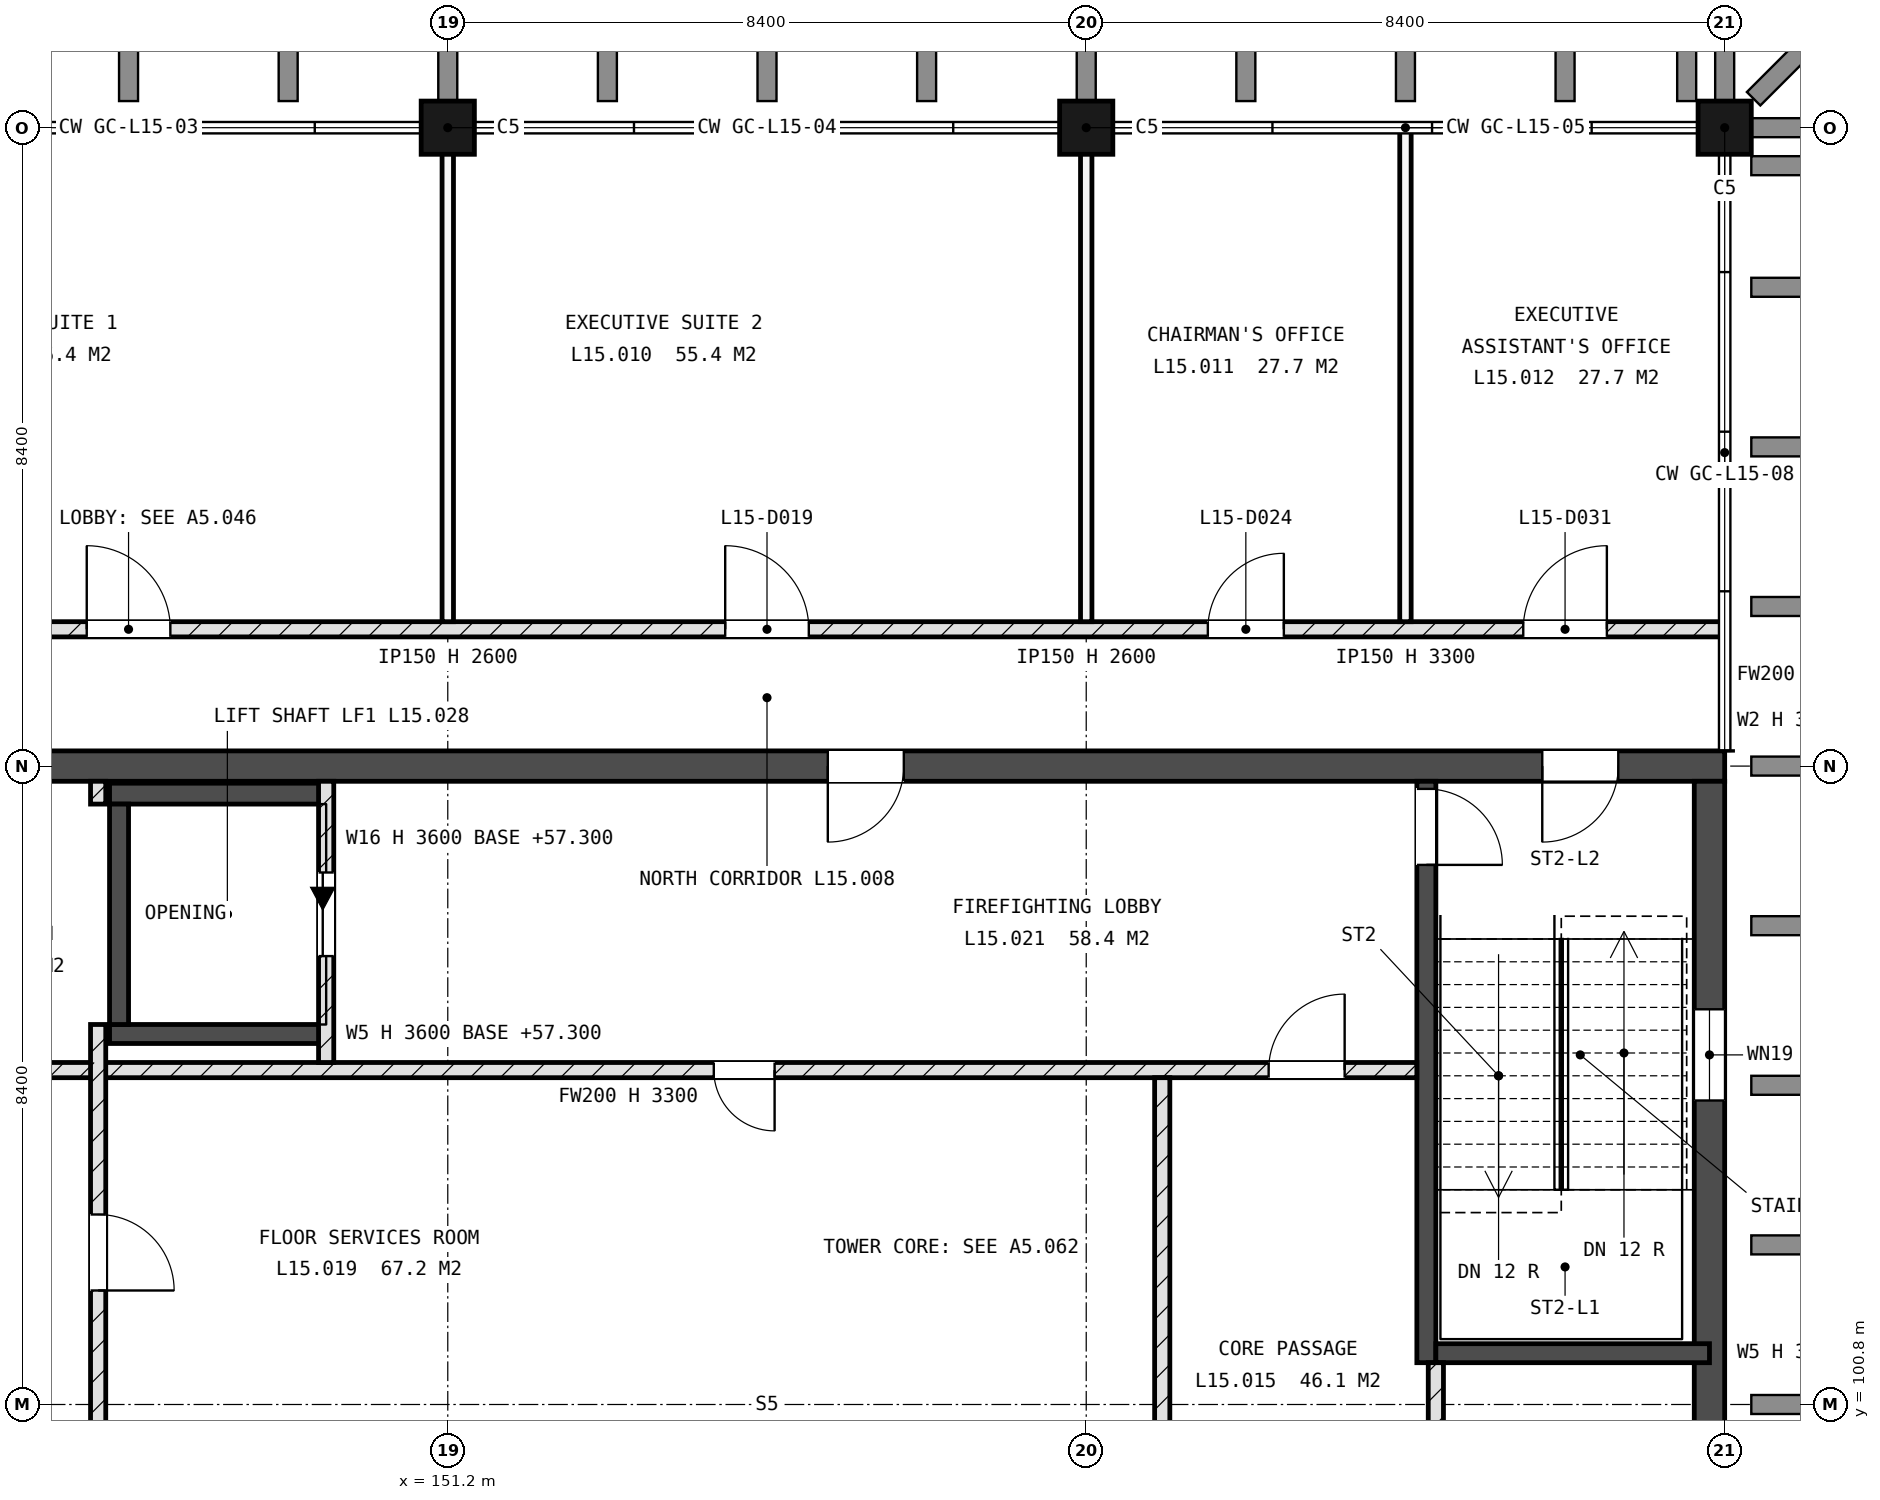
"""IFC4 building model, lengths in metres.
Left out: names, types, materials, properties, quantities, classifications, styles, units other than length and angle.
Written with IfcOpenShell. Run it as: python <this file> out.ifc"""

import sys

from ifc_helpers import new_model, si_unit, direction, frame, frame_2d, origin, origin_2d, place, context, subcontext, project, spatial, rectangle, extrude, element, fill, save


model = new_model("IFC4")
c1 = context("Model", 3, precision=1e-05, world=origin(), true_north=direction((0.0, 1.0)))
c2 = subcontext(c1, "Body", "Model", "MODEL_VIEW")
j1 = project(units=[si_unit("LENGTHUNIT", "METRE"), si_unit("PLANEANGLEUNIT", "RADIAN")], contexts=[c1])
p1 = place(None, origin())
s1 = spatial("IfcSite", under=j1, at=p1, CompositionType="ELEMENT")
p2 = place(p1, origin())
s2 = spatial("IfcBuilding", under=s1, at=p2, CompositionType="ELEMENT")
p3 = place(p2, frame((0.0, 0.0, 57.6)))
s3 = spatial("IfcBuildingStorey", under=s2, at=p3, CompositionType="ELEMENT", Elevation=57.6)
for number, where, z_axis, x_axis in (
    (1, (151.2, 117.6, -0.3), (0.0, 0.0, 1.0), (1.0, 0.0, 0.0)),
    (2, (159.6, 117.6, -0.3), (0.0, 0.0, 1.0), (1.0, 0.0, 0.0)),
    (3, (168.0, 117.6, -0.3), (0.0, 0.0, 1.0), (1.0, 0.0, 0.0)),
):
    element("IfcColumn", number, at=place(p3, frame(where, z_axis=z_axis, x_axis=x_axis)), inside=s3, PredefinedType="COLUMN", context=c2, shape_type="SweptSolid", body=[
        extrude(rectangle(XDim=0.7, YDim=0.7, at=origin_2d()), origin(), (0.0, 0.0, 1.0), 3.6),
    ])
p4 = place(p3, frame((142.8, 109.2, -0.3), z_axis=(0.0, 0.0, 1.0), x_axis=(1.0, 0.0, 0.0)))
e4 = element("IfcWall", 4, at=p4, inside=s3, PredefinedType="SHEAR", context=c2, shape_type="SweptSolid", body=[
    extrude(rectangle(XDim=25.2, YDim=0.4, at=frame_2d((12.6, 0.0))), origin(), (0.0, 0.0, 1.0), 3.6),
])
p5 = place(p4, frame((22.8, 0.0, 0.3)))
e5 = element("IfcOpeningElement", 5, at=p5, cuts=e4, PredefinedType="OPENING", context=c2, shape_type="SweptSolid", body=[
    extrude(rectangle(XDim=1.0, YDim=2.1, at=frame_2d((0.5, 1.05))), frame((0.0, 0.21, 0.0), z_axis=(0.0, -1.0, 0.0), x_axis=(1.0, 0.0, 0.0)), (0.0, 0.0, 1.0), 0.42),
])
p6 = place(p4, frame((1.5, 0.0, 0.3)))
e6 = element("IfcOpeningElement", 6, at=p6, cuts=e4, PredefinedType="OPENING", context=c2, shape_type="SweptSolid", body=[
    extrude(rectangle(XDim=0.8, YDim=2.1, at=frame_2d((0.4, 1.05))), frame((0.0, 0.21, 0.0), z_axis=(0.0, -1.0, 0.0), x_axis=(1.0, 0.0, 0.0)), (0.0, 0.0, 1.0), 0.42),
])
p7 = place(p4, frame((13.4, 0.0, 0.3)))
e7 = element("IfcOpeningElement", 7, at=p7, cuts=e4, PredefinedType="OPENING", context=c2, shape_type="SweptSolid", body=[
    extrude(rectangle(XDim=1.0, YDim=2.1, at=frame_2d((0.5, 1.05))), frame((0.0, 0.21, 0.0), z_axis=(0.0, -1.0, 0.0), x_axis=(1.0, 0.0, 0.0)), (0.0, 0.0, 1.0), 0.42),
])
p8 = place(p3, frame((167.8, 92.6, -0.3), z_axis=(0.0, 0.0, 1.0), x_axis=(0.0, 1.0, 0.0)))
e8 = element("IfcWall", 8, at=p8, inside=s3, PredefinedType="SHEAR", context=c2, shape_type="SweptSolid", body=[
    extrude(rectangle(XDim=16.4, YDim=0.4, at=frame_2d((8.2, 0.0))), origin(), (0.0, 0.0, 1.0), 3.6),
])
p9 = place(p8, frame((12.2, 0.0, 1.9)))
e9 = element("IfcOpeningElement", 9, at=p9, cuts=e8, PredefinedType="OPENING", context=c2, shape_type="SweptSolid", body=[
    extrude(rectangle(XDim=1.2, YDim=0.9, at=frame_2d((0.6, 0.45))), frame((0.0, 0.21, 0.0), z_axis=(0.0, -1.0, 0.0), x_axis=(1.0, 0.0, 0.0)), (0.0, 0.0, 1.0), 0.42),
])
p10 = place(p3, frame((164.075, 101.35, -0.3), z_axis=(0.0, 0.0, 1.0), x_axis=(0.0, 1.0, 0.0)))
e10 = element("IfcWall", 10, at=p10, inside=s3, PredefinedType="SHEAR", context=c2, shape_type="SweptSolid", body=[
    extrude(rectangle(XDim=7.65, YDim=0.25, at=frame_2d((3.825, 0.0))), origin(), (0.0, 0.0, 1.0), 3.6),
])
p11 = place(p10, frame((6.55, 0.0, 0.3)))
e11 = element("IfcOpeningElement", 11, at=p11, cuts=e10, PredefinedType="OPENING", context=c2, shape_type="SweptSolid", body=[
    extrude(rectangle(XDim=1.0, YDim=2.1, at=frame_2d((0.5, 1.05))), frame((0.0, 0.135, 0.0), z_axis=(0.0, -1.0, 0.0), x_axis=(1.0, 0.0, 0.0)), (0.0, 0.0, 1.0), 0.27),
])
p12 = place(p3, frame((164.2, 101.475, -0.3), z_axis=(0.0, 0.0, 1.0), x_axis=(1.0, 0.0, 0.0)))
e12 = element("IfcWall", 12, at=p12, inside=s3, PredefinedType="SHEAR", context=c2, shape_type="SweptSolid", body=[
    extrude(rectangle(XDim=3.6, YDim=0.25, at=frame_2d((1.8, 0.0))), origin(), (0.0, 0.0, 1.0), 3.6),
])
p13 = place(p3, frame((146.75, 105.675, -0.3), z_axis=(0.0, 0.0, 1.0), x_axis=(1.0, 0.0, 0.0)))
e13 = element("IfcWall", 13, at=p13, inside=s3, PredefinedType="SHEAR", context=c2, shape_type="SweptSolid", body=[
    extrude(rectangle(XDim=2.85, YDim=0.25, at=frame_2d((1.425, 0.0))), origin(), (0.0, 0.0, 1.0), 3.6),
])
p14 = place(p3, frame((146.75, 108.837, -0.3), z_axis=(0.0, 0.0, 1.0), x_axis=(1.0, 0.0, 0.0)))
e14 = element("IfcWall", 14, at=p14, inside=s3, PredefinedType="SHEAR", context=c2, shape_type="SweptSolid", body=[
    extrude(rectangle(XDim=2.85, YDim=0.275, at=frame_2d((1.425, 0.0))), origin(), (0.0, 0.0, 1.0), 3.6),
])
p15 = place(p3, frame((146.875, 105.8, -0.3), z_axis=(0.0, 0.0, 1.0), x_axis=(0.0, 1.0, 0.0)))
e15 = element("IfcWall", 15, at=p15, inside=s3, PredefinedType="SHEAR", context=c2, shape_type="SweptSolid", body=[
    extrude(rectangle(XDim=2.9, YDim=0.25, at=frame_2d((1.45, 0.0))), origin(), (0.0, 0.0, 1.0), 3.6),
])
p16 = place(p3, frame((143.2, 105.2, 0.0), z_axis=(0.0, 0.0, 1.0), x_axis=(1.0, 0.0, 0.0)))
e16 = element("IfcWall", 16, at=p16, inside=s3, PredefinedType="SOLIDWALL", context=c2, shape_type="SweptSolid", body=[
    extrude(rectangle(XDim=20.75, YDim=0.2, at=frame_2d((10.375, 0.0))), origin(), (0.0, 0.0, 1.0), 3.3),
])
p17 = place(p16, frame((11.5, 0.0, 0.0)))
e17 = element("IfcOpeningElement", 17, at=p17, cuts=e16, PredefinedType="OPENING", context=c2, shape_type="SweptSolid", body=[
    extrude(rectangle(XDim=0.8, YDim=2.1, at=frame_2d((0.4, 1.05))), frame((0.0, 0.11, 0.0), z_axis=(0.0, -1.0, 0.0), x_axis=(1.0, 0.0, 0.0)), (0.0, 0.0, 1.0), 0.22),
])
p18 = place(p16, frame((18.8, 0.0, 0.0)))
e18 = element("IfcOpeningElement", 18, at=p18, cuts=e16, PredefinedType="OPENING", context=c2, shape_type="SweptSolid", body=[
    extrude(rectangle(XDim=1.0, YDim=2.1, at=frame_2d((0.5, 1.05))), frame((0.0, 0.11, 0.0), z_axis=(0.0, -1.0, 0.0), x_axis=(1.0, 0.0, 0.0)), (0.0, 0.0, 1.0), 0.22),
])
p19 = place(p3, frame((142.8, 111.0, 0.0), z_axis=(0.0, 0.0, 1.0), x_axis=(1.0, 0.0, 0.0)))
e19 = element("IfcWall", 19, at=p19, inside=s3, PredefinedType="SOLIDWALL", context=c2, shape_type="SweptSolid", body=[
    extrude(rectangle(XDim=25.2, YDim=0.2, at=frame_2d((12.6, 0.0))), origin(), (0.0, 0.0, 1.0), 3.3),
])
p20 = place(p19, frame((3.65, 0.0, 0.0)))
e20 = element("IfcOpeningElement", 20, at=p20, cuts=e19, PredefinedType="OPENING", context=c2, shape_type="SweptSolid", body=[
    extrude(rectangle(XDim=1.1, YDim=2.25, at=frame_2d((0.55, 1.125))), frame((0.0, 0.11, 0.0), z_axis=(0.0, -1.0, 0.0), x_axis=(1.0, 0.0, 0.0)), (0.0, 0.0, 1.0), 0.22),
])
p21 = place(p19, frame((12.05, 0.0, 0.0)))
e21 = element("IfcOpeningElement", 21, at=p21, cuts=e19, PredefinedType="OPENING", context=c2, shape_type="SweptSolid", body=[
    extrude(rectangle(XDim=1.1, YDim=2.25, at=frame_2d((0.55, 1.125))), frame((0.0, 0.11, 0.0), z_axis=(0.0, -1.0, 0.0), x_axis=(1.0, 0.0, 0.0)), (0.0, 0.0, 1.0), 0.22),
])
p22 = place(p19, frame((18.4, 0.0, 0.0)))
e22 = element("IfcOpeningElement", 22, at=p22, cuts=e19, PredefinedType="OPENING", context=c2, shape_type="SweptSolid", body=[
    extrude(rectangle(XDim=1.0, YDim=2.1, at=frame_2d((0.5, 1.05))), frame((0.0, 0.11, 0.0), z_axis=(0.0, -1.0, 0.0), x_axis=(1.0, 0.0, 0.0)), (0.0, 0.0, 1.0), 0.22),
])
p23 = place(p19, frame((22.55, 0.0, 0.0)))
e23 = element("IfcOpeningElement", 23, at=p23, cuts=e19, PredefinedType="OPENING", context=c2, shape_type="SweptSolid", body=[
    extrude(rectangle(XDim=1.1, YDim=2.25, at=frame_2d((0.55, 1.125))), frame((0.0, 0.11, 0.0), z_axis=(0.0, -1.0, 0.0), x_axis=(1.0, 0.0, 0.0)), (0.0, 0.0, 1.0), 0.22),
])
p24 = place(p3, frame((146.6, 100.5, 0.0), z_axis=(0.0, 0.0, 1.0), x_axis=(0.0, 1.0, 0.0)))
e24 = element("IfcWall", 24, at=p24, inside=s3, PredefinedType="SOLIDWALL", context=c2, shape_type="SweptSolid", body=[
    extrude(rectangle(XDim=5.3, YDim=0.2, at=frame_2d((2.65, 0.0))), origin(), (0.0, 0.0, 1.0), 3.3),
])
p25 = place(p24, frame((1.8, 0.0, 0.0)))
e25 = element("IfcOpeningElement", 25, at=p25, cuts=e24, PredefinedType="OPENING", context=c2, shape_type="SweptSolid", body=[
    extrude(rectangle(XDim=1.0, YDim=2.1, at=frame_2d((0.5, 1.05))), frame((0.0, 0.11, 0.0), z_axis=(0.0, -1.0, 0.0), x_axis=(1.0, 0.0, 0.0)), (0.0, 0.0, 1.0), 0.22),
])
p26 = place(p3, frame((146.6, 108.7, 0.0), z_axis=(0.0, 0.0, 1.0), x_axis=(0.0, 1.0, 0.0)))
e26 = element("IfcWall", 26, at=p26, inside=s3, PredefinedType="SOLIDWALL", context=c2, shape_type="SweptSolid", body=[
    extrude(rectangle(XDim=0.3, YDim=0.2, at=frame_2d((0.15, 0.0))), origin(), (0.0, 0.0, 1.0), 3.3),
])
p27 = place(p3, frame((149.6, 105.3, 0.0), z_axis=(0.0, 0.0, 1.0), x_axis=(0.0, 1.0, 0.0)))
e27 = element("IfcWall", 27, at=p27, inside=s3, PredefinedType="SOLIDWALL", context=c2, shape_type="SweptSolid", body=[
    extrude(rectangle(XDim=3.7, YDim=0.2, at=frame_2d((1.85, 0.0))), origin(), (0.0, 0.0, 1.0), 3.3),
])
p28 = place(p27, frame((1.4, 0.0, 0.0)))
e28 = element("IfcOpeningElement", 28, at=p28, cuts=e27, PredefinedType="OPENING", context=c2, shape_type="SweptSolid", body=[
    extrude(rectangle(XDim=1.1, YDim=2.1, at=frame_2d((0.55, 1.05))), frame((0.0, 0.11, 0.0), z_axis=(0.0, -1.0, 0.0), x_axis=(1.0, 0.0, 0.0)), (0.0, 0.0, 1.0), 0.22),
])
for number, where, z_axis, x_axis in (
    (29, (151.2, 111.1, 0.0), (0.0, 0.0, 1.0), (0.0, 1.0, 0.0)),
    (30, (159.6, 111.1, 0.0), (0.0, 0.0, 1.0), (0.0, 1.0, 0.0)),
):
    element("IfcWall", number, at=place(p3, frame(where, z_axis=z_axis, x_axis=x_axis)), inside=s3, PredefinedType="PARTITIONING", context=c2, shape_type="SweptSolid", body=[
        extrude(rectangle(XDim=6.5, YDim=0.15, at=frame_2d((3.25, 0.0))), origin(), (0.0, 0.0, 1.0), 2.6),
    ])
p29 = place(p3, frame((160.6, 92.6, 0.0), z_axis=(0.0, 0.0, 1.0), x_axis=(0.0, 1.0, 0.0)))
e31 = element("IfcWall", 31, at=p29, inside=s3, PredefinedType="SOLIDWALL", context=c2, shape_type="SweptSolid", body=[
    extrude(rectangle(XDim=12.5, YDim=0.2, at=frame_2d((6.25, 0.0))), origin(), (0.0, 0.0, 1.0), 3.3),
])
p30 = place(p29, frame((5.1, 0.0, 0.0)))
e32 = element("IfcOpeningElement", 32, at=p30, cuts=e31, PredefinedType="OPENING", context=c2, shape_type="SweptSolid", body=[
    extrude(rectangle(XDim=0.8, YDim=2.1, at=frame_2d((0.4, 1.05))), frame((0.0, 0.11, 0.0), z_axis=(0.0, -1.0, 0.0), x_axis=(1.0, 0.0, 0.0)), (0.0, 0.0, 1.0), 0.22),
])
p31 = place(p29, frame((0.8, 0.0, 0.0)))
e33 = element("IfcOpeningElement", 33, at=p31, cuts=e31, PredefinedType="OPENING", context=c2, shape_type="SweptSolid", body=[
    extrude(rectangle(XDim=1.0, YDim=2.1, at=frame_2d((0.5, 1.05))), frame((0.0, 0.11, 0.0), z_axis=(0.0, -1.0, 0.0), x_axis=(1.0, 0.0, 0.0)), (0.0, 0.0, 1.0), 0.22),
])
p32 = place(p3, frame((163.8, 111.1, 0.0), z_axis=(0.0, 0.0, 1.0), x_axis=(0.0, 1.0, 0.0)))
e34 = element("IfcWall", 34, at=p32, inside=s3, PredefinedType="PARTITIONING", context=c2, shape_type="SweptSolid", body=[
    extrude(rectangle(XDim=6.5, YDim=0.15, at=frame_2d((3.25, 0.0))), origin(), (0.0, 0.0, 1.0), 3.3),
])
p33 = place(p3, frame((164.2, 92.6, 0.0), z_axis=(0.0, 0.0, 1.0), x_axis=(0.0, 1.0, 0.0)))
e35 = element("IfcWall", 35, at=p33, inside=s3, PredefinedType="SOLIDWALL", context=c2, shape_type="SweptSolid", body=[
    extrude(rectangle(XDim=8.75, YDim=0.2, at=frame_2d((4.375, 0.0))), origin(), (0.0, 0.0, 1.0), 3.3),
])
p34 = place(p33, frame((1.7, 0.0, 0.0)))
e36 = element("IfcOpeningElement", 36, at=p34, cuts=e35, PredefinedType="OPENING", context=c2, shape_type="SweptSolid", body=[
    extrude(rectangle(XDim=0.8, YDim=2.1, at=frame_2d((0.4, 1.05))), frame((0.0, 0.11, 0.0), z_axis=(0.0, -1.0, 0.0), x_axis=(1.0, 0.0, 0.0)), (0.0, 0.0, 1.0), 0.22),
])
p35 = place(p33, frame((6.3, 0.0, 0.0)))
e37 = element("IfcOpeningElement", 37, at=p35, cuts=e35, PredefinedType="OPENING", context=c2, shape_type="SweptSolid", body=[
    extrude(rectangle(XDim=0.8, YDim=2.1, at=frame_2d((0.4, 1.05))), frame((0.0, 0.11, 0.0), z_axis=(0.0, -1.0, 0.0), x_axis=(1.0, 0.0, 0.0)), (0.0, 0.0, 1.0), 0.22),
])
p36 = place(p9, origin())
e38 = element("IfcWindow", 38, at=p36, inside=s3, PartitioningType="SINGLE_PANEL", PredefinedType="WINDOW", context=c2, shape_type="SweptSolid", body=[
    extrude(rectangle(XDim=1.2, YDim=0.9, at=frame_2d((0.6, 0.45))), frame((0.0, 0.03, 0.0), z_axis=(0.0, -1.0, 0.0), x_axis=(1.0, 0.0, 0.0)), (0.0, 0.0, 1.0), 0.06),
])
fill(e9, e38)
p37 = place(p28, origin())
e39 = element("IfcDoor", 39, at=p37, inside=s3, OperationType="SLIDING_TO_LEFT", PredefinedType="DOOR", context=c2, shape_type="SweptSolid", body=[
    extrude(rectangle(XDim=1.1, YDim=2.1, at=frame_2d((0.55, 1.05))), frame((0.0, 0.025, 0.0), z_axis=(0.0, -1.0, 0.0), x_axis=(1.0, 0.0, 0.0)), (0.0, 0.0, 1.0), 0.05),
])
fill(e28, e39)
p38 = place(p11, origin())
e40 = element("IfcDoor", 40, at=p38, inside=s3, OperationType="SINGLE_SWING_LEFT", PredefinedType="DOOR", context=c2, shape_type="SweptSolid", body=[
    extrude(rectangle(XDim=1.0, YDim=2.1, at=frame_2d((0.5, 1.05))), frame((0.0, 0.025, 0.0), z_axis=(0.0, -1.0, 0.0), x_axis=(1.0, 0.0, 0.0)), (0.0, 0.0, 1.0), 0.05),
])
fill(e11, e40)
p39 = place(p5, origin())
e41 = element("IfcDoor", 41, at=p39, inside=s3, OperationType="SINGLE_SWING_LEFT", PredefinedType="DOOR", context=c2, shape_type="SweptSolid", body=[
    extrude(rectangle(XDim=1.0, YDim=2.1, at=frame_2d((0.5, 1.05))), frame((0.0, 0.025, 0.0), z_axis=(0.0, -1.0, 0.0), x_axis=(1.0, 0.0, 0.0)), (0.0, 0.0, 1.0), 0.05),
])
fill(e5, e41)
p40 = place(p20, origin())
e42 = element("IfcDoor", 42, at=p40, inside=s3, OperationType="SINGLE_SWING_RIGHT", PredefinedType="DOOR", context=c2, shape_type="SweptSolid", body=[
    extrude(rectangle(XDim=1.1, YDim=2.25, at=frame_2d((0.55, 1.125))), frame((0.0, 0.025, 0.0), z_axis=(0.0, -1.0, 0.0), x_axis=(1.0, 0.0, 0.0)), (0.0, 0.0, 1.0), 0.05),
])
fill(e20, e42)
p41 = place(p21, origin())
e43 = element("IfcDoor", 43, at=p41, inside=s3, OperationType="SINGLE_SWING_RIGHT", PredefinedType="DOOR", context=c2, shape_type="SweptSolid", body=[
    extrude(rectangle(XDim=1.1, YDim=2.25, at=frame_2d((0.55, 1.125))), frame((0.0, 0.025, 0.0), z_axis=(0.0, -1.0, 0.0), x_axis=(1.0, 0.0, 0.0)), (0.0, 0.0, 1.0), 0.05),
])
fill(e21, e43)
p42 = place(p22, origin())
e44 = element("IfcDoor", 44, at=p42, inside=s3, OperationType="SINGLE_SWING_LEFT", PredefinedType="DOOR", context=c2, shape_type="SweptSolid", body=[
    extrude(rectangle(XDim=1.0, YDim=2.1, at=frame_2d((0.5, 1.05))), frame((0.0, 0.025, 0.0), z_axis=(0.0, -1.0, 0.0), x_axis=(1.0, 0.0, 0.0)), (0.0, 0.0, 1.0), 0.05),
])
fill(e22, e44)
p43 = place(p23, origin())
e45 = element("IfcDoor", 45, at=p43, inside=s3, OperationType="SINGLE_SWING_LEFT", PredefinedType="DOOR", context=c2, shape_type="SweptSolid", body=[
    extrude(rectangle(XDim=1.1, YDim=2.25, at=frame_2d((0.55, 1.125))), frame((0.0, 0.025, 0.0), z_axis=(0.0, -1.0, 0.0), x_axis=(1.0, 0.0, 0.0)), (0.0, 0.0, 1.0), 0.05),
])
fill(e23, e45)
p44 = place(p17, origin())
e46 = element("IfcDoor", 46, at=p44, inside=s3, OperationType="SINGLE_SWING_RIGHT", PredefinedType="DOOR", context=c2, shape_type="SweptSolid", body=[
    extrude(rectangle(XDim=0.8, YDim=2.1, at=frame_2d((0.4, 1.05))), frame((0.0, 0.025, 0.0), z_axis=(0.0, -1.0, 0.0), x_axis=(1.0, 0.0, 0.0)), (0.0, 0.0, 1.0), 0.05),
])
fill(e17, e46)
p45 = place(p25, origin())
e47 = element("IfcDoor", 47, at=p45, inside=s3, OperationType="SINGLE_SWING_LEFT", PredefinedType="DOOR", context=c2, shape_type="SweptSolid", body=[
    extrude(rectangle(XDim=1.0, YDim=2.1, at=frame_2d((0.5, 1.05))), frame((0.0, 0.025, 0.0), z_axis=(0.0, -1.0, 0.0), x_axis=(1.0, 0.0, 0.0)), (0.0, 0.0, 1.0), 0.05),
])
fill(e25, e47)
p46 = place(p7, origin())
e48 = element("IfcDoor", 48, at=p46, inside=s3, OperationType="SINGLE_SWING_LEFT", PredefinedType="DOOR", context=c2, shape_type="SweptSolid", body=[
    extrude(rectangle(XDim=1.0, YDim=2.1, at=frame_2d((0.5, 1.05))), frame((0.0, 0.025, 0.0), z_axis=(0.0, -1.0, 0.0), x_axis=(1.0, 0.0, 0.0)), (0.0, 0.0, 1.0), 0.05),
])
fill(e7, e48)
p47 = place(p18, origin())
e49 = element("IfcDoor", 49, at=p47, inside=s3, OperationType="SINGLE_SWING_LEFT", PredefinedType="DOOR", context=c2, shape_type="SweptSolid", body=[
    extrude(rectangle(XDim=1.0, YDim=2.1, at=frame_2d((0.5, 1.05))), frame((0.0, 0.025, 0.0), z_axis=(0.0, -1.0, 0.0), x_axis=(1.0, 0.0, 0.0)), (0.0, 0.0, 1.0), 0.05),
])
fill(e18, e49)
save(model, sys.argv[1])
